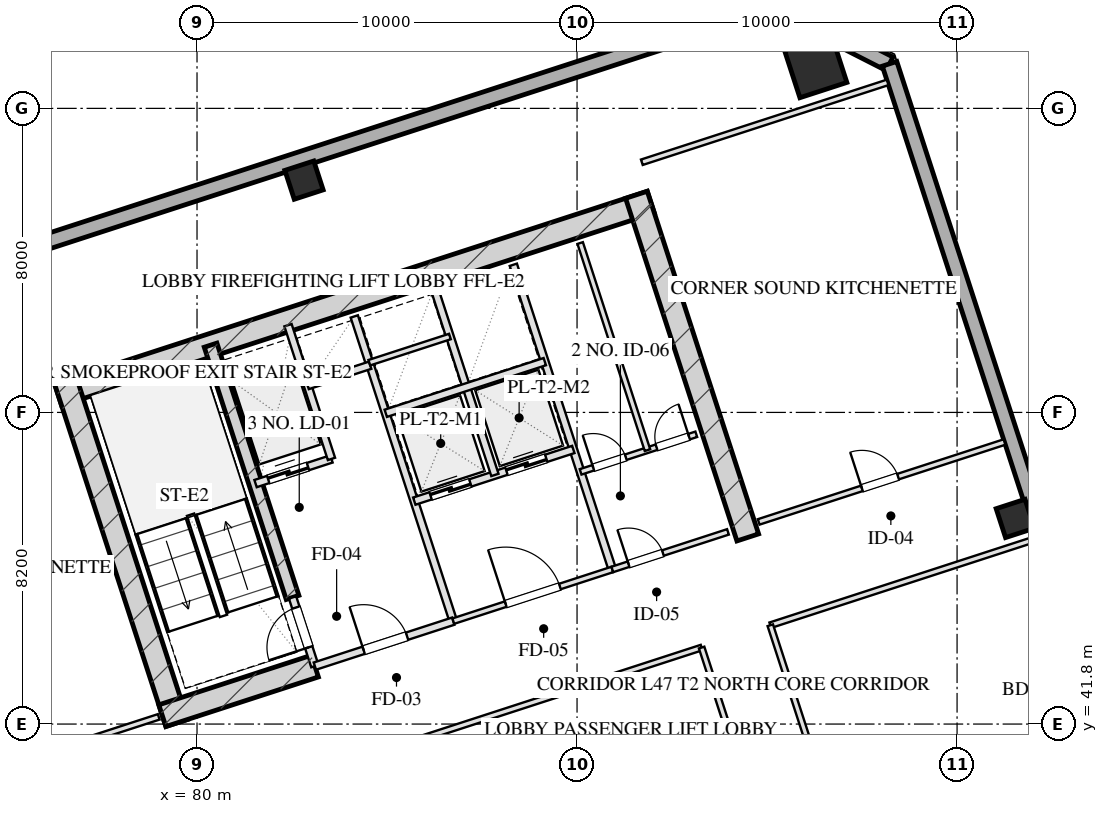
"""IFC4 building model, lengths in metres.
Left out: names, types, materials, properties, quantities, classifications, styles, units other than length and angle.
Written with IfcOpenShell. Run it as: python <this file> out.ifc"""

import sys

from ifc_helpers import new_model, si_unit, direction, frame, frame_2d, origin, origin_2d, place, context, subcontext, project, spatial, rectangle, hollow_rectangle, extrude, element, fill, save


model = new_model("IFC4")
c1 = context("Model", 3, precision=1e-05, world=origin(), true_north=direction((0.0, 1.0)))
c2 = subcontext(c1, "Body", "Model", "MODEL_VIEW")
j1 = project(units=[si_unit("LENGTHUNIT", "METRE"), si_unit("PLANEANGLEUNIT", "RADIAN")], contexts=[c1])
p1 = place(None, origin())
s1 = spatial("IfcSite", under=j1, at=p1, CompositionType="ELEMENT")
p2 = place(p1, origin())
s2 = spatial("IfcBuilding", under=s1, at=p2, CompositionType="ELEMENT")
p3 = place(p2, frame((0.0, 0.0, 177.1)))
s3 = spatial("IfcBuildingStorey", under=s2, at=p3, CompositionType="ELEMENT", Elevation=177.1)
p4 = place(p3, frame((76.344, 50.466, 0.0), z_axis=(0.0, 0.0, 1.0), x_axis=(0.951055727519, 0.309019421968, 0.0)))
e1 = element("IfcWall", 1, at=p4, inside=s3, PredefinedType="SHEAR", context=c2, shape_type="SweptSolid", body=[
    extrude(rectangle(XDim=16.4, YDim=0.6, at=frame_2d((8.2, 0.0))), origin(), (0.0, 0.0, 1.0), 3.45),
])
for number, where, z_axis, x_axis in (
    (2, (79.466, 41.828, 0.0), (0.0, 0.0, 1.0), (-0.309, 0.951, 0.0)),
    (3, (94.492, 46.71, 0.0), (0.0, 0.0, 1.0), (-0.309, 0.951, 0.0)),
):
    element("IfcWall", number, at=place(p3, frame(where, z_axis=z_axis, x_axis=x_axis)), inside=s3, PredefinedType="SHEAR", context=c2, shape_type="SweptSolid", body=[
        extrude(rectangle(XDim=9.48, YDim=0.6, at=frame_2d((4.74, 0.0))), origin(), (0.0, 0.0, 1.0), 3.45),
    ])
p5 = place(p3, frame((82.514, 45.131, 0.0), z_axis=(0.0, 0.0, 1.0), x_axis=(-0.308988790936, 0.951065679686, 0.0)))
e4 = element("IfcWall", 4, at=p5, inside=s3, PredefinedType="SHEAR", context=c2, shape_type="SweptSolid", body=[
    extrude(rectangle(XDim=6.98, YDim=0.35, at=frame_2d((3.49, 0.0))), origin(), (0.0, 0.0, 1.0), 3.45),
])
p6 = place(p3, frame((79.087, 42.021, 0.0), z_axis=(0.0, 0.0, 1.0), x_axis=(0.951062550203, 0.3089984233, 0.0)))
e5 = element("IfcWall", 5, at=p6, inside=s3, PredefinedType="SHEAR", context=c2, shape_type="SweptSolid", body=[
    extrude(rectangle(XDim=4.22, YDim=0.6, at=frame_2d((2.11, 0.0))), origin(), (0.0, 0.0, 1.0), 3.45),
])
p7 = place(p3, frame((96.281, 59.099, 0.0), z_axis=(0.0, 0.0, 1.0), x_axis=(0.951056516295, 0.309016994375, 0.0)))
e6 = element("IfcColumn", 6, at=p7, inside=s3, PredefinedType="COLUMN", context=c2, shape_type="SweptSolid", body=[
    extrude(hollow_rectangle(XDim=1.3, YDim=1.3, WallThickness=0.045, at=origin_2d()), origin(), (0.0, 0.0, 1.0), 3.451),
])
for number, where, z_axis, x_axis in (
    (7, (101.532, 47.21, 0.0), (0.0, 0.0, 1.0), (0.951, 0.309, 0.0)),
    (8, (82.815, 56.112, 0.0), (0.0, 0.0, 1.0), (0.951, 0.309, 0.0)),
):
    element("IfcColumn", number, at=place(p3, frame(where, z_axis=z_axis, x_axis=x_axis)), inside=s3, PredefinedType="COLUMN", context=c2, shape_type="SweptSolid", body=[
        extrude(hollow_rectangle(XDim=0.8, YDim=0.8, WallThickness=0.028, at=origin_2d()), origin(), (0.0, 0.0, 1.0), 3.451),
    ])
p8 = place(p3, frame((81.776, 8.827, 0.0), z_axis=(0.0, 0.0, 1.0), x_axis=(-0.309014228706, 0.951057414911, 0.0)))
e9 = element("IfcWall", 9, at=p8, inside=s3, PredefinedType="SOLIDWALL", context=c2, shape_type="SweptSolid", body=[
    extrude(rectangle(XDim=42.8, YDim=0.4, at=frame_2d((21.4, 0.0))), origin(), (0.0, 0.0, 1.0), 2.61),
])
p9 = place(p8, frame((13.95, 0.0, 0.75)))
e10 = element("IfcOpeningElement", 10, at=p9, cuts=e9, PredefinedType="OPENING", context=c2, shape_type="SweptSolid", body=[
    extrude(rectangle(XDim=2.1, YDim=1.46, at=frame_2d((1.05, 0.73))), frame((0.0, 0.21, 0.0), z_axis=(0.0, -1.0, 0.0), x_axis=(1.0, 0.0, 0.0)), (0.0, 0.0, 1.0), 0.42),
])
p10 = place(p8, frame((17.75, 0.0, 0.75)))
e11 = element("IfcOpeningElement", 11, at=p10, cuts=e9, PredefinedType="OPENING", context=c2, shape_type="SweptSolid", body=[
    extrude(rectangle(XDim=2.1, YDim=1.46, at=frame_2d((1.05, 0.73))), frame((0.0, 0.21, 0.0), z_axis=(0.0, -1.0, 0.0), x_axis=(1.0, 0.0, 0.0)), (0.0, 0.0, 1.0), 0.42),
])
p11 = place(p8, frame((23.95, 0.0, 0.0)))
e12 = element("IfcOpeningElement", 12, at=p11, cuts=e9, PredefinedType="OPENING", context=c2, shape_type="SweptSolid", body=[
    extrude(rectangle(XDim=1.1, YDim=2.15, at=frame_2d((0.55, 1.075))), frame((0.0, 0.21, 0.0), z_axis=(0.0, -1.0, 0.0), x_axis=(1.0, 0.0, 0.0)), (0.0, 0.0, 1.0), 0.42),
])
p12 = place(p3, frame((70.092, 52.556, 0.0), z_axis=(0.0, 0.0, 1.0), x_axis=(0.951057580055, 0.30901372044, 0.0)))
e13 = element("IfcWall", 13, at=p12, inside=s3, PredefinedType="SOLIDWALL", context=c2, shape_type="SweptSolid", body=[
    extrude(rectangle(XDim=26.4, YDim=0.4, at=frame_2d((13.2, 0.0))), origin(), (0.0, 0.0, 1.0), 2.61),
])
p13 = place(p3, frame((95.199, 60.714, 0.0), z_axis=(0.0, 0.0, 1.0), x_axis=(0.891020832027, -0.453962417932, 0.0)))
e14 = element("IfcWall", 14, at=p13, inside=s3, PredefinedType="SOLIDWALL", context=c2, shape_type="SweptSolid", body=[
    extrude(rectangle(XDim=3.394, YDim=0.4, at=frame_2d((1.697, 0.0))), origin(), (0.0, 0.0, 1.0), 2.61),
])
p14 = place(p3, frame((98.224, 59.173, 0.0), z_axis=(0.0, 0.0, 1.0), x_axis=(0.309014228706, -0.951057414911, 0.0)))
e15 = element("IfcWall", 15, at=p14, inside=s3, PredefinedType="SOLIDWALL", context=c2, shape_type="SweptSolid", body=[
    extrude(rectangle(XDim=42.8, YDim=0.4, at=frame_2d((21.4, 0.0))), origin(), (0.0, 0.0, 1.0), 2.61),
])
p15 = place(p14, frame((26.75, 0.0, 0.75)))
e16 = element("IfcOpeningElement", 16, at=p15, cuts=e15, PredefinedType="OPENING", context=c2, shape_type="SweptSolid", body=[
    extrude(rectangle(XDim=2.1, YDim=1.46, at=frame_2d((1.05, 0.73))), frame((0.0, 0.21, 0.0), z_axis=(0.0, -1.0, 0.0), x_axis=(1.0, 0.0, 0.0)), (0.0, 0.0, 1.0), 0.42),
])
p16 = place(p14, frame((22.95, 0.0, 0.75)))
e17 = element("IfcOpeningElement", 17, at=p16, cuts=e15, PredefinedType="OPENING", context=c2, shape_type="SweptSolid", body=[
    extrude(rectangle(XDim=2.1, YDim=1.46, at=frame_2d((1.05, 0.73))), frame((0.0, 0.21, 0.0), z_axis=(0.0, -1.0, 0.0), x_axis=(1.0, 0.0, 0.0)), (0.0, 0.0, 1.0), 0.42),
])
p17 = place(p14, frame((16.45, 0.0, 0.0)))
e18 = element("IfcOpeningElement", 18, at=p17, cuts=e15, PredefinedType="OPENING", context=c2, shape_type="SweptSolid", body=[
    extrude(rectangle(XDim=1.1, YDim=2.15, at=frame_2d((0.55, 1.075))), frame((0.0, 0.21, 0.0), z_axis=(0.0, -1.0, 0.0), x_axis=(1.0, 0.0, 0.0)), (0.0, 0.0, 1.0), 0.42),
])
p18 = place(p3, frame((83.101, 43.324, 0.0), z_axis=(0.0, 0.0, 1.0), x_axis=(-0.309048298632, 0.951046344356, 0.0)))
e19 = element("IfcWall", 19, at=p18, inside=s3, PredefinedType="PARTITIONING", context=c2, shape_type="SweptSolid", body=[
    extrude(rectangle(XDim=1.9, YDim=0.2, at=frame_2d((0.95, 0.0))), origin(), (0.0, 0.0, 1.0), 3.175),
])
p19 = place(p18, frame((0.52, 0.0, 0.0)))
e20 = element("IfcOpeningElement", 20, at=p19, cuts=e19, PredefinedType="OPENING", context=c2, shape_type="SweptSolid", body=[
    extrude(rectangle(XDim=1.1, YDim=2.05, at=frame_2d((0.55, 1.025))), frame((0.0, 0.11, 0.0), z_axis=(0.0, -1.0, 0.0), x_axis=(1.0, 0.0, 0.0)), (0.0, 0.0, 1.0), 0.22),
])
p20 = place(p3, frame((86.743, 44.508, 0.0), z_axis=(0.0, 0.0, 1.0), x_axis=(-0.309016001439, 0.951056838919, 0.0)))
e21 = element("IfcWall", 21, at=p20, inside=s3, PredefinedType="PARTITIONING", context=c2, shape_type="SweptSolid", body=[
    extrude(rectangle(XDim=8.43, YDim=0.2, at=frame_2d((4.215, 0.0))), origin(), (0.0, 0.0, 1.0), 3.175),
])
p21 = place(p3, frame((83.101, 43.324, 0.0), z_axis=(0.0, 0.0, 1.0), x_axis=(0.951052804469, 0.309028417967, 0.0)))
e22 = element("IfcWall", 22, at=p21, inside=s3, PredefinedType="PARTITIONING", context=c2, shape_type="SweptSolid", body=[
    extrude(rectangle(XDim=3.83, YDim=0.2, at=frame_2d((1.915, 0.0))), origin(), (0.0, 0.0, 1.0), 3.175),
])
p22 = place(p21, frame((1.35, 0.0, 0.0)))
e23 = element("IfcOpeningElement", 23, at=p22, cuts=e22, PredefinedType="OPENING", context=c2, shape_type="SweptSolid", body=[
    extrude(rectangle(XDim=1.2, YDim=2.05, at=frame_2d((0.6, 1.025))), frame((0.0, 0.11, 0.0), z_axis=(0.0, -1.0, 0.0), x_axis=(1.0, 0.0, 0.0)), (0.0, 0.0, 1.0), 0.22),
])
p23 = place(p3, frame((81.54, 48.127, 0.0), z_axis=(0.0, 0.0, 1.0), x_axis=(0.951062257173, 0.308999325213, 0.0)))
e24 = element("IfcWall", 24, at=p23, inside=s3, PredefinedType="PARTITIONING", context=c2, shape_type="SweptSolid", body=[
    extrude(rectangle(XDim=2.1, YDim=0.2, at=frame_2d((1.05, 0.0))), origin(), (0.0, 0.0, 1.0), 3.175),
])
p24 = place(p23, frame((0.35, 0.0, 0.0)))
e25 = element("IfcOpeningElement", 25, at=p24, cuts=e24, PredefinedType="OPENING", context=c2, shape_type="SweptSolid", body=[
    extrude(rectangle(XDim=1.1, YDim=2.05, at=frame_2d((0.55, 1.025))), frame((0.0, 0.11, 0.0), z_axis=(0.0, -1.0, 0.0), x_axis=(1.0, 0.0, 0.0)), (0.0, 0.0, 1.0), 0.22),
])
p25 = place(p3, frame((83.538, 48.776, 0.0), z_axis=(0.0, 0.0, 1.0), x_axis=(-0.3089935693, 0.951064127245, 0.0)))
e26 = element("IfcWall", 26, at=p25, inside=s3, PredefinedType="PARTITIONING", context=c2, shape_type="SweptSolid", body=[
    extrude(rectangle(XDim=3.7, YDim=0.2, at=frame_2d((1.85, 0.0))), origin(), (0.0, 0.0, 1.0), 3.175),
])
p26 = place(p3, frame((82.91, 50.707, 0.0), z_axis=(0.0, 0.0, 1.0), x_axis=(0.951041328149, 0.309063734775, 0.0)))
e27 = element("IfcWall", 27, at=p26, inside=s3, PredefinedType="PARTITIONING", context=c2, shape_type="SweptSolid", body=[
    extrude(rectangle(XDim=1.73, YDim=0.2, at=frame_2d((0.865, 0.0))), origin(), (0.0, 0.0, 1.0), 3.175),
])
p27 = place(p3, frame((90.928, 45.868, 0.0), z_axis=(0.0, 0.0, 1.0), x_axis=(-0.309042196757, 0.951048327176, 0.0)))
e28 = element("IfcWall", 28, at=p27, inside=s3, PredefinedType="PARTITIONING", context=c2, shape_type="SweptSolid", body=[
    extrude(rectangle(XDim=8.43, YDim=0.2, at=frame_2d((4.215, 0.0))), origin(), (0.0, 0.0, 1.0), 3.175),
])
p28 = place(p3, frame((86.743, 44.508, 0.0), z_axis=(0.0, 0.0, 1.0), x_axis=(0.951063829732, 0.308994485023, 0.0)))
e29 = element("IfcWall", 29, at=p28, inside=s3, PredefinedType="PARTITIONING", context=c2, shape_type="SweptSolid", body=[
    extrude(rectangle(XDim=4.4, YDim=0.15, at=frame_2d((2.2, 0.0))), origin(), (0.0, 0.0, 1.0), 3.175),
])
p29 = place(p28, frame((1.45, 0.0, 0.0)))
e30 = element("IfcOpeningElement", 30, at=p29, cuts=e29, PredefinedType="OPENING", context=c2, shape_type="SweptSolid", body=[
    extrude(rectangle(XDim=1.5, YDim=2.05, at=frame_2d((0.75, 1.025))), frame((0.0, 0.085, 0.0), z_axis=(0.0, -1.0, 0.0), x_axis=(1.0, 0.0, 0.0)), (0.0, 0.0, 1.0), 0.17),
])
p30 = place(p3, frame((85.718, 47.666, 0.0), z_axis=(0.0, 0.0, 1.0), x_axis=(0.951058531764, 0.30901079133, 0.0)))
e31 = element("IfcWall", 31, at=p30, inside=s3, PredefinedType="PARTITIONING", context=c2, shape_type="SweptSolid", body=[
    extrude(rectangle(XDim=4.4, YDim=0.2, at=frame_2d((2.2, 0.0))), origin(), (0.0, 0.0, 1.0), 3.175),
])
p31 = place(p30, frame((0.45, 0.0, 0.0)))
e32 = element("IfcOpeningElement", 32, at=p31, cuts=e31, PredefinedType="OPENING", context=c2, shape_type="SweptSolid", body=[
    extrude(rectangle(XDim=1.1, YDim=2.05, at=frame_2d((0.55, 1.025))), frame((0.0, 0.11, 0.0), z_axis=(0.0, -1.0, 0.0), x_axis=(1.0, 0.0, 0.0)), (0.0, 0.0, 1.0), 0.22),
])
p32 = place(p30, frame((2.55, 0.0, 0.0)))
e33 = element("IfcOpeningElement", 33, at=p32, cuts=e31, PredefinedType="OPENING", context=c2, shape_type="SweptSolid", body=[
    extrude(rectangle(XDim=1.1, YDim=2.05, at=frame_2d((0.55, 1.025))), frame((0.0, 0.11, 0.0), z_axis=(0.0, -1.0, 0.0), x_axis=(1.0, 0.0, 0.0)), (0.0, 0.0, 1.0), 0.22),
])
p33 = place(p3, frame((87.838, 48.354, 0.0), z_axis=(0.0, 0.0, 1.0), x_axis=(-0.3090093719, 0.951058992953, 0.0)))
e34 = element("IfcWall", 34, at=p33, inside=s3, PredefinedType="PARTITIONING", context=c2, shape_type="SweptSolid", body=[
    extrude(rectangle(XDim=5.11, YDim=0.2, at=frame_2d((2.555, 0.0))), origin(), (0.0, 0.0, 1.0), 3.175),
])
p34 = place(p3, frame((84.967, 49.977, 0.0), z_axis=(0.0, 0.0, 1.0), x_axis=(0.951063829732, 0.308994485023, 0.0)))
e35 = element("IfcWall", 35, at=p34, inside=s3, PredefinedType="PARTITIONING", context=c2, shape_type="SweptSolid", body=[
    extrude(rectangle(XDim=4.4, YDim=0.2, at=frame_2d((2.2, 0.0))), origin(), (0.0, 0.0, 1.0), 3.175),
])
p35 = place(p3, frame((84.534, 51.308, 0.0), z_axis=(0.0, 0.0, 1.0), x_axis=(0.951075093106, 0.308959814982, 0.0)))
e36 = element("IfcWall", 36, at=p35, inside=s3, PredefinedType="PARTITIONING", context=c2, shape_type="SweptSolid", body=[
    extrude(rectangle(XDim=2.23, YDim=0.15, at=frame_2d((1.115, 0.0))), origin(), (0.0, 0.0, 1.0), 3.175),
])
p36 = place(p3, frame((90.928, 45.868, 0.0), z_axis=(0.0, 0.0, 1.0), x_axis=(0.951059297078, 0.309008435874, 0.0)))
e37 = element("IfcWall", 37, at=p36, inside=s3, PredefinedType="PARTITIONING", context=c2, shape_type="SweptSolid", body=[
    extrude(rectangle(XDim=3.2, YDim=0.15, at=frame_2d((1.6, 0.0))), origin(), (0.0, 0.0, 1.0), 3.175),
])
p37 = place(p36, frame((0.45, 0.0, 0.0)))
e38 = element("IfcOpeningElement", 38, at=p37, cuts=e37, PredefinedType="OPENING", context=c2, shape_type="SweptSolid", body=[
    extrude(rectangle(XDim=0.95, YDim=2.05, at=frame_2d((0.475, 1.025))), frame((0.0, 0.085, 0.0), z_axis=(0.0, -1.0, 0.0), x_axis=(1.0, 0.0, 0.0)), (0.0, 0.0, 1.0), 0.17),
])
p38 = place(p3, frame((90.094, 48.436, 0.0), z_axis=(0.0, 0.0, 1.0), x_axis=(0.951066581729, 0.308986014439, 0.0)))
e39 = element("IfcWall", 39, at=p38, inside=s3, PredefinedType="PARTITIONING", context=c2, shape_type="SweptSolid", body=[
    extrude(rectangle(XDim=3.2, YDim=0.15, at=frame_2d((1.6, 0.0))), origin(), (0.0, 0.0, 1.0), 3.175),
])
p39 = place(p38, frame((0.35, 0.0, 0.0)))
e40 = element("IfcOpeningElement", 40, at=p39, cuts=e39, PredefinedType="OPENING", context=c2, shape_type="SweptSolid", body=[
    extrude(rectangle(XDim=0.9, YDim=2.05, at=frame_2d((0.45, 1.025))), frame((0.0, 0.085, 0.0), z_axis=(0.0, -1.0, 0.0), x_axis=(1.0, 0.0, 0.0)), (0.0, 0.0, 1.0), 0.17),
])
p40 = place(p38, frame((2.1, 0.0, 0.0)))
e41 = element("IfcOpeningElement", 41, at=p40, cuts=e39, PredefinedType="OPENING", context=c2, shape_type="SweptSolid", body=[
    extrude(rectangle(XDim=0.9, YDim=2.05, at=frame_2d((0.45, 1.025))), frame((0.0, 0.085, 0.0), z_axis=(0.0, -1.0, 0.0), x_axis=(1.0, 0.0, 0.0)), (0.0, 0.0, 1.0), 0.17),
])
p41 = place(p3, frame((91.853, 49.007, 0.0), z_axis=(0.0, 0.0, 1.0), x_axis=(-0.309022487551, 0.951054731437, 0.0)))
e42 = element("IfcWall", 42, at=p41, inside=s3, PredefinedType="PARTITIONING", context=c2, shape_type="SweptSolid", body=[
    extrude(rectangle(XDim=5.73, YDim=0.15, at=frame_2d((2.865, 0.0))), origin(), (0.0, 0.0, 1.0), 3.175),
])
p42 = place(p3, frame((71.955, 39.703, 0.0), z_axis=(0.0, 0.0, 1.0), x_axis=(0.951060977215, 0.309003264738, 0.0)))
e43 = element("IfcWall", 43, at=p42, inside=s3, PredefinedType="PARTITIONING", context=c2, shape_type="SweptSolid", body=[
    extrude(rectangle(XDim=7.4, YDim=0.15, at=frame_2d((3.7, 0.0))), origin(), (0.0, 0.0, 1.0), 3.175),
])
p43 = place(p42, frame((3.108, 0.0, 0.0)))
e44 = element("IfcOpeningElement", 44, at=p43, cuts=e43, PredefinedType="OPENING", context=c2, shape_type="SweptSolid", body=[
    extrude(rectangle(XDim=1.0, YDim=2.05, at=frame_2d((0.5, 1.025))), frame((0.0, 0.085, 0.0), z_axis=(0.0, -1.0, 0.0), x_axis=(1.0, 0.0, 0.0)), (0.0, 0.0, 1.0), 0.17),
])
p44 = place(p3, frame((91.705, 56.582, 0.0), z_axis=(0.0, 0.0, 1.0), x_axis=(0.951057811516, 0.309013008068, 0.0)))
e45 = element("IfcWall", 45, at=p44, inside=s3, PredefinedType="PARTITIONING", context=c2, shape_type="SweptSolid", body=[
    extrude(rectangle(XDim=6.8, YDim=0.15, at=frame_2d((3.4, 0.0))), origin(), (0.0, 0.0, 1.0), 3.175),
])
p45 = place(p3, frame((94.78, 47.119, 0.0), z_axis=(0.0, 0.0, 1.0), x_axis=(0.951057811516, 0.309013008068, 0.0)))
e46 = element("IfcWall", 46, at=p45, inside=s3, PredefinedType="PARTITIONING", context=c2, shape_type="SweptSolid", body=[
    extrude(rectangle(XDim=6.8, YDim=0.15, at=frame_2d((3.4, 0.0))), origin(), (0.0, 0.0, 1.0), 3.175),
])
p46 = place(p45, frame((2.856, 0.0, 0.0)))
e47 = element("IfcOpeningElement", 47, at=p46, cuts=e46, PredefinedType="OPENING", context=c2, shape_type="SweptSolid", body=[
    extrude(rectangle(XDim=1.0, YDim=2.05, at=frame_2d((0.5, 1.025))), frame((0.0, 0.085, 0.0), z_axis=(0.0, -1.0, 0.0), x_axis=(1.0, 0.0, 0.0)), (0.0, 0.0, 1.0), 0.17),
])
p47 = place(p3, frame((85.527, 41.295, 0.0), z_axis=(0.0, 0.0, 1.0), x_axis=(0.951055419664, 0.309020369437, 0.0)))
e48 = element("IfcWall", 48, at=p47, inside=s3, PredefinedType="PARTITIONING", context=c2, shape_type="SweptSolid", body=[
    extrude(rectangle(XDim=8.15, YDim=0.15, at=frame_2d((4.075, 0.0))), origin(), (0.0, 0.0, 1.0), 3.175),
])
p48 = place(p3, frame((95.085, 44.4, 0.0), z_axis=(0.0, 0.0, 1.0), x_axis=(0.95105749975, 0.309013967595, 0.0)))
e49 = element("IfcWall", 49, at=p48, inside=s3, PredefinedType="PARTITIONING", context=c2, shape_type="SweptSolid", body=[
    extrude(rectangle(XDim=7.35, YDim=0.15, at=frame_2d((3.675, 0.0))), origin(), (0.0, 0.0, 1.0), 3.175),
])
p49 = place(p3, frame((98.42, 27.988, 0.0), z_axis=(0.0, 0.0, 1.0), x_axis=(-0.309004459387, 0.951060589068, 0.0)))
e50 = element("IfcWall", 50, at=p49, inside=s3, PredefinedType="PARTITIONING", context=c2, shape_type="SweptSolid", body=[
    extrude(rectangle(XDim=16.64, YDim=0.15, at=frame_2d((8.32, 0.0))), origin(), (0.0, 0.0, 1.0), 3.175),
])
p50 = place(p49, frame((7.68, 0.0, 0.0)))
e51 = element("IfcOpeningElement", 51, at=p50, cuts=e50, PredefinedType="OPENING", context=c2, shape_type="SweptSolid", body=[
    extrude(rectangle(XDim=1.1, YDim=2.05, at=frame_2d((0.55, 1.025))), frame((0.0, 0.085, 0.0), z_axis=(0.0, -1.0, 0.0), x_axis=(1.0, 0.0, 0.0)), (0.0, 0.0, 1.0), 0.17),
])
p51 = place(p3, frame((100.227, 28.575, 0.0), z_axis=(0.0, 0.0, 1.0), x_axis=(-0.30901773025, 0.951056277195, 0.0)))
e52 = element("IfcWall", 52, at=p51, inside=s3, PredefinedType="PARTITIONING", context=c2, shape_type="SweptSolid", body=[
    extrude(rectangle(XDim=16.64, YDim=0.15, at=frame_2d((8.32, 0.0))), origin(), (0.0, 0.0, 1.0), 3.175),
])
p52 = place(p51, frame((3.32, 0.0, 0.0)))
e53 = element("IfcOpeningElement", 53, at=p52, cuts=e52, PredefinedType="OPENING", context=c2, shape_type="SweptSolid", body=[
    extrude(rectangle(XDim=1.05, YDim=2.05, at=frame_2d((0.525, 1.025))), frame((0.0, 0.085, 0.0), z_axis=(0.0, -1.0, 0.0), x_axis=(1.0, 0.0, 0.0)), (0.0, 0.0, 1.0), 0.17),
])
p53 = place(p51, frame((11.64, 0.0, 0.0)))
e54 = element("IfcOpeningElement", 54, at=p53, cuts=e52, PredefinedType="OPENING", context=c2, shape_type="SweptSolid", body=[
    extrude(rectangle(XDim=1.0, YDim=2.05, at=frame_2d((0.5, 1.025))), frame((0.0, 0.085, 0.0), z_axis=(0.0, -1.0, 0.0), x_axis=(1.0, 0.0, 0.0)), (0.0, 0.0, 1.0), 0.17),
])
p54 = place(p19, origin())
e55 = element("IfcDoor", 55, at=p54, inside=s3, OperationType="SINGLE_SWING_LEFT", PredefinedType="DOOR", context=c2, shape_type="SweptSolid", body=[
    extrude(rectangle(XDim=1.1, YDim=2.05, at=frame_2d((0.55, 1.025))), frame((0.0, 0.025, 0.0), z_axis=(0.0, -1.0, 0.0), x_axis=(1.0, 0.0, 0.0)), (0.0, 0.0, 1.0), 0.05),
])
fill(e20, e55)
p55 = place(p22, origin())
e56 = element("IfcDoor", 56, at=p55, inside=s3, OperationType="SINGLE_SWING_LEFT", PredefinedType="DOOR", context=c2, shape_type="SweptSolid", body=[
    extrude(rectangle(XDim=1.2, YDim=2.05, at=frame_2d((0.6, 1.025))), frame((0.0, 0.025, 0.0), z_axis=(0.0, -1.0, 0.0), x_axis=(1.0, 0.0, 0.0)), (0.0, 0.0, 1.0), 0.05),
])
fill(e23, e56)
p56 = place(p24, origin())
e57 = element("IfcDoor", 57, at=p56, inside=s3, OperationType="DOUBLE_DOOR_SLIDING", PredefinedType="DOOR", context=c2, shape_type="SweptSolid", body=[
    extrude(rectangle(XDim=1.1, YDim=2.05, at=frame_2d((0.55, 1.025))), frame((0.0, 0.025, 0.0), z_axis=(0.0, -1.0, 0.0), x_axis=(1.0, 0.0, 0.0)), (0.0, 0.0, 1.0), 0.05),
])
fill(e25, e57)
p57 = place(p29, origin())
e58 = element("IfcDoor", 58, at=p57, inside=s3, OperationType="SINGLE_SWING_LEFT", PredefinedType="DOOR", context=c2, shape_type="SweptSolid", body=[
    extrude(rectangle(XDim=1.5, YDim=2.05, at=frame_2d((0.75, 1.025))), frame((0.0, 0.025, 0.0), z_axis=(0.0, -1.0, 0.0), x_axis=(1.0, 0.0, 0.0)), (0.0, 0.0, 1.0), 0.05),
])
fill(e30, e58)
p58 = place(p31, origin())
e59 = element("IfcDoor", 59, at=p58, inside=s3, OperationType="DOUBLE_DOOR_SLIDING", PredefinedType="DOOR", context=c2, shape_type="SweptSolid", body=[
    extrude(rectangle(XDim=1.1, YDim=2.05, at=frame_2d((0.55, 1.025))), frame((0.0, 0.025, 0.0), z_axis=(0.0, -1.0, 0.0), x_axis=(1.0, 0.0, 0.0)), (0.0, 0.0, 1.0), 0.05),
])
fill(e32, e59)
p59 = place(p32, origin())
e60 = element("IfcDoor", 60, at=p59, inside=s3, OperationType="DOUBLE_DOOR_SLIDING", PredefinedType="DOOR", context=c2, shape_type="SweptSolid", body=[
    extrude(rectangle(XDim=1.1, YDim=2.05, at=frame_2d((0.55, 1.025))), frame((0.0, 0.025, 0.0), z_axis=(0.0, -1.0, 0.0), x_axis=(1.0, 0.0, 0.0)), (0.0, 0.0, 1.0), 0.05),
])
fill(e33, e60)
p60 = place(p37, origin())
e61 = element("IfcDoor", 61, at=p60, inside=s3, OperationType="SINGLE_SWING_LEFT", PredefinedType="DOOR", context=c2, shape_type="SweptSolid", body=[
    extrude(rectangle(XDim=0.95, YDim=2.05, at=frame_2d((0.475, 1.025))), frame((0.0, 0.025, 0.0), z_axis=(0.0, -1.0, 0.0), x_axis=(1.0, 0.0, 0.0)), (0.0, 0.0, 1.0), 0.05),
])
fill(e38, e61)
p61 = place(p39, origin())
e62 = element("IfcDoor", 62, at=p61, inside=s3, OperationType="SINGLE_SWING_LEFT", PredefinedType="DOOR", context=c2, shape_type="SweptSolid", body=[
    extrude(rectangle(XDim=0.9, YDim=2.05, at=frame_2d((0.45, 1.025))), frame((0.0, 0.025, 0.0), z_axis=(0.0, -1.0, 0.0), x_axis=(1.0, 0.0, 0.0)), (0.0, 0.0, 1.0), 0.05),
])
fill(e40, e62)
p62 = place(p40, origin())
e63 = element("IfcDoor", 63, at=p62, inside=s3, OperationType="SINGLE_SWING_RIGHT", PredefinedType="DOOR", context=c2, shape_type="SweptSolid", body=[
    extrude(rectangle(XDim=0.9, YDim=2.05, at=frame_2d((0.45, 1.025))), frame((0.0, 0.025, 0.0), z_axis=(0.0, -1.0, 0.0), x_axis=(1.0, 0.0, 0.0)), (0.0, 0.0, 1.0), 0.05),
])
fill(e41, e63)
p63 = place(p46, origin())
e64 = element("IfcDoor", 64, at=p63, inside=s3, OperationType="SINGLE_SWING_LEFT", PredefinedType="DOOR", context=c2, shape_type="SweptSolid", body=[
    extrude(rectangle(XDim=1.0, YDim=2.05, at=frame_2d((0.5, 1.025))), frame((0.0, 0.025, 0.0), z_axis=(0.0, -1.0, 0.0), x_axis=(1.0, 0.0, 0.0)), (0.0, 0.0, 1.0), 0.05),
])
fill(e47, e64)
save(model, sys.argv[1])
